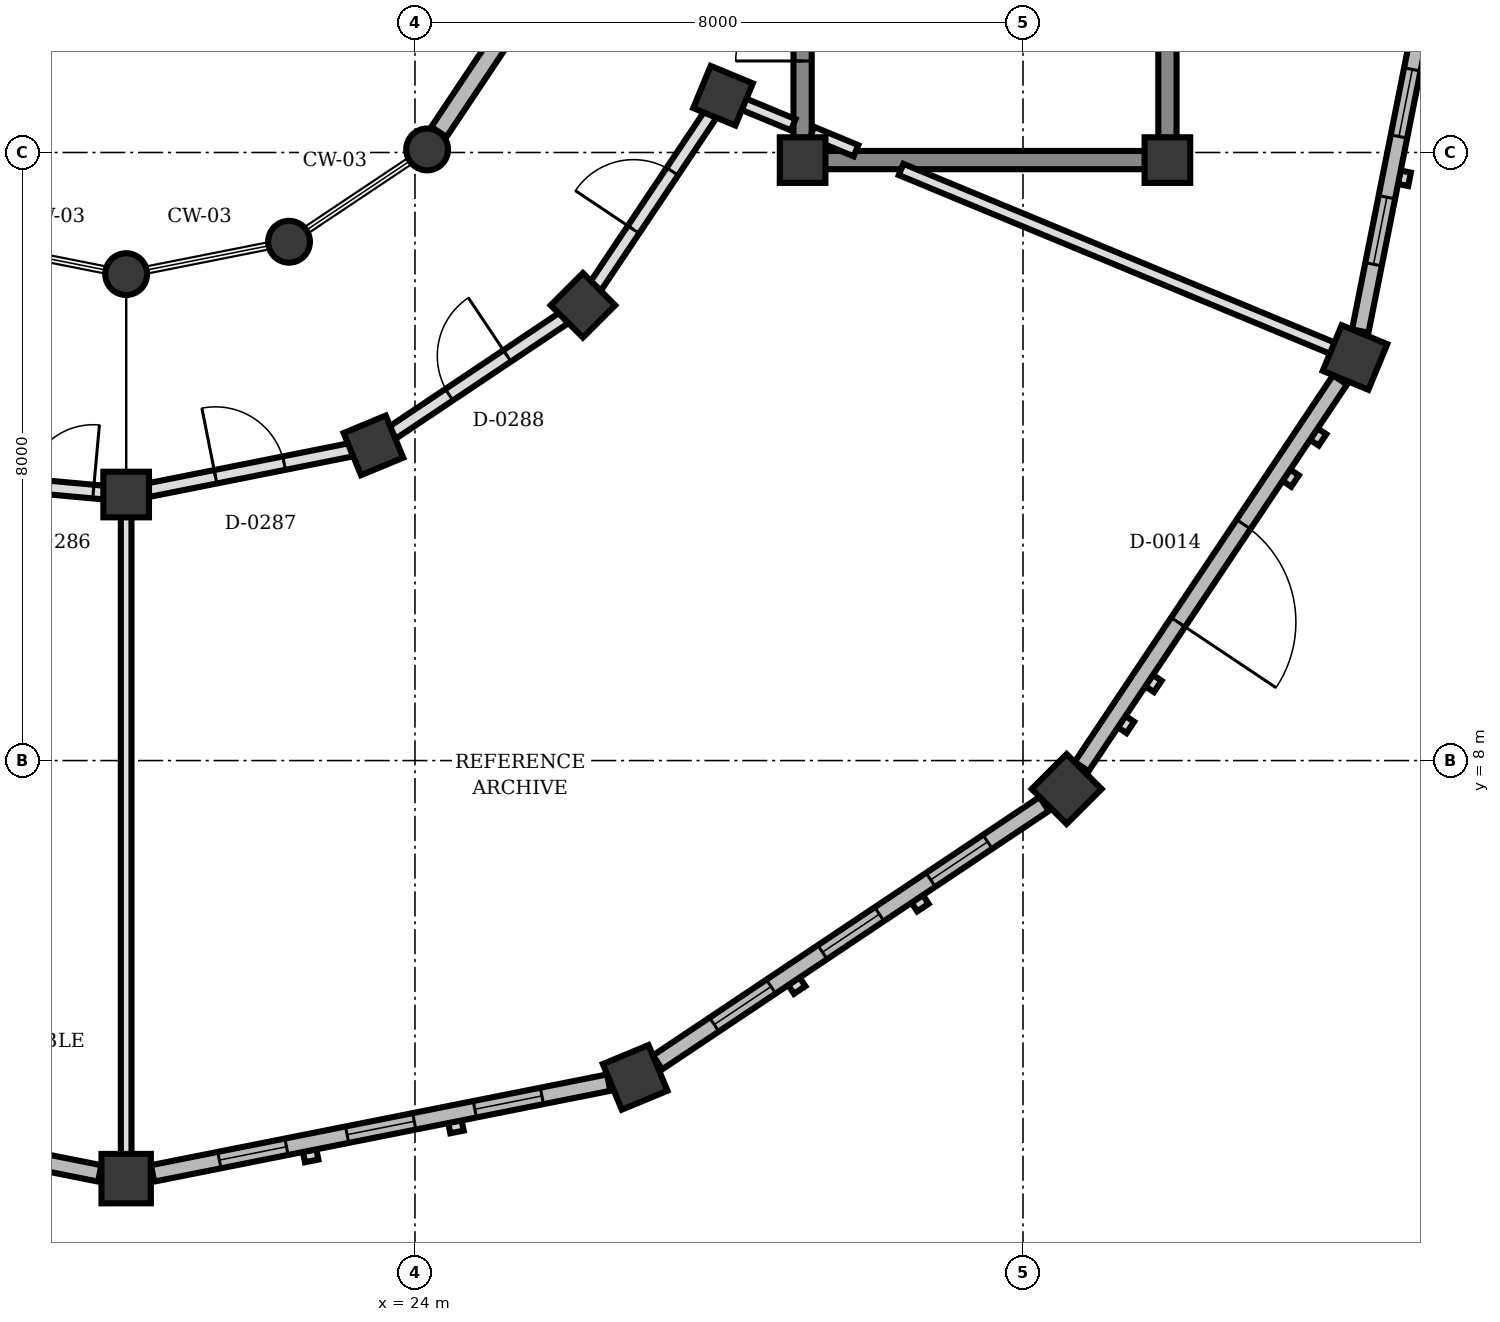
"""IFC4 building model, lengths in metres.
Left out: names, types, materials, properties, quantities, classifications, styles, units other than length and angle.
Written with IfcOpenShell. Run it as: python <this file> out.ifc"""

import sys

from ifc_helpers import new_model, si_unit, direction, frame, frame_2d, origin, origin_2d, place, context, subcontext, project, spatial, rectangle, circle, extrude, element, fill, save


model = new_model("IFC4")
c1 = context("Model", 3, precision=1e-05, world=origin(), true_north=direction((0.0, 1.0)))
c2 = subcontext(c1, "Body", "Model", "MODEL_VIEW")
j1 = project(units=[si_unit("LENGTHUNIT", "METRE"), si_unit("PLANEANGLEUNIT", "RADIAN")], contexts=[c1])
p1 = place(None, origin())
s1 = spatial("IfcSite", under=j1, at=p1, CompositionType="ELEMENT")
p2 = place(p1, origin())
s2 = spatial("IfcBuilding", under=s1, at=p2, CompositionType="ELEMENT")
p3 = place(p2, origin())
s3 = spatial("IfcBuildingStorey", under=s2, at=p3, CompositionType="ELEMENT", Elevation=0.0)
for number, where, z_axis, x_axis in (
    (1, (29.1, 15.9, 0.0), (0.0, 0.0, 1.0), (1.0, 0.0, 0.0)),
    (2, (33.9, 15.9, 0.0), (0.0, 0.0, 1.0), (1.0, 0.0, 0.0)),
):
    element("IfcColumn", number, at=place(p3, frame(where, z_axis=z_axis, x_axis=x_axis)), inside=s3, PredefinedType="COLUMN", context=c2, shape_type="SweptSolid", body=[
        extrude(rectangle(XDim=0.6, YDim=0.6, at=origin_2d()), origin(), (0.0, 0.0, 1.0), 4.5),
    ])
for number, where, z_axis, x_axis in (
    (3, (20.2, 14.4, 0.0), (0.0, 0.0, 1.0), (1.0, 0.0, 0.0)),
    (4, (22.343, 14.826, 0.0), (0.0, 0.0, 1.0), (1.0, 0.0, 0.0)),
    (5, (24.16, 16.04, 0.0), (0.0, 0.0, 1.0), (1.0, 0.0, 0.0)),
):
    element("IfcColumn", number, at=place(p3, frame(where, z_axis=z_axis, x_axis=x_axis)), inside=s3, PredefinedType="COLUMN", context=c2, shape_type="SweptSolid", body=[
        extrude(circle(Radius=0.275, at=origin_2d()), origin(), (0.0, 0.0, 1.0), 4.5),
    ])
for number, where, z_axis, x_axis in (
    (6, (20.2, 11.5, 0.0), (0.0, 0.0, 1.0), (0.0, -1.0, 0.0)),
    (7, (23.453, 12.147, 0.0), (0.0, 0.0, 1.0), (0.383, -0.924, 0.0)),
    (8, (26.21, 13.99, 0.0), (0.0, 0.0, 1.0), (0.707, -0.707, 0.0)),
    (9, (28.053, 16.747, 0.0), (0.0, 0.0, 1.0), (0.924, -0.383, 0.0)),
):
    element("IfcColumn", number, at=place(p3, frame(where, z_axis=z_axis, x_axis=x_axis)), inside=s3, PredefinedType="COLUMN", context=c2, shape_type="SweptSolid", body=[
        extrude(rectangle(XDim=0.6, YDim=0.6, at=origin_2d()), origin(), (0.0, 0.0, 1.0), 4.5),
    ])
for number, where, z_axis, x_axis in (
    (10, (20.2, 2.5, 0.0), (0.0, 0.0, 1.0), (0.0, -1.0, 0.0)),
    (11, (26.897, 3.832, 0.0), (0.0, 0.0, 1.0), (0.383, -0.924, 0.0)),
    (12, (32.574, 7.626, 0.0), (0.0, 0.0, 1.0), (0.707, -0.707, 0.0)),
    (13, (36.368, 13.303, 0.0), (0.0, 0.0, 1.0), (0.924, -0.383, 0.0)),
):
    element("IfcColumn", number, at=place(p3, frame(where, z_axis=z_axis, x_axis=x_axis)), inside=s3, PredefinedType="COLUMN", context=c2, shape_type="SweptSolid", body=[
        extrude(rectangle(XDim=0.65, YDim=0.65, at=origin_2d()), origin(), (0.0, 0.0, 1.0), 4.5),
    ])
p4 = place(p3, frame((19.852, 2.569, 0.0), z_axis=(0.0, 0.0, 1.0), x_axis=(-0.98077967596, 0.19511849534, 0.0)))
e14 = element("IfcWall", 14, at=p4, inside=s3, PredefinedType="SOLIDWALL", context=c2, shape_type="SweptSolid", body=[
    extrude(rectangle(XDim=6.119, YDim=0.22, at=frame_2d((3.059, 0.0))), origin(), (0.0, 0.0, 1.0), 3.55),
])
p5 = place(p4, frame((1.068, 0.0, 1.15)))
e15 = element("IfcOpeningElement", 15, at=p5, cuts=e14, PredefinedType="OPENING", context=c2, shape_type="SweptSolid", body=[
    extrude(rectangle(XDim=0.8, YDim=1.1, at=frame_2d((0.4, 0.55))), frame((0.0, 0.12, 0.0), z_axis=(0.0, -1.0, 0.0), x_axis=(1.0, 0.0, 0.0)), (0.0, 0.0, 1.0), 0.24),
])
p6 = place(p4, frame((4.373, 0.0, 1.15)))
e16 = element("IfcOpeningElement", 16, at=p6, cuts=e14, PredefinedType="OPENING", context=c2, shape_type="SweptSolid", body=[
    extrude(rectangle(XDim=0.8, YDim=1.1, at=frame_2d((0.4, 0.55))), frame((0.0, 0.12, 0.0), z_axis=(0.0, -1.0, 0.0), x_axis=(1.0, 0.0, 0.0)), (0.0, 0.0, 1.0), 0.24),
])
p7 = place(p3, frame((26.549, 3.763, 0.0), z_axis=(0.0, 0.0, 1.0), x_axis=(-0.98077967596, -0.19511849534, 0.0)))
e17 = element("IfcWall", 17, at=p7, inside=s3, PredefinedType="SOLIDWALL", context=c2, shape_type="SweptSolid", body=[
    extrude(rectangle(XDim=6.119, YDim=0.22, at=frame_2d((3.059, 0.0))), origin(), (0.0, 0.0, 1.0), 3.55),
])
p8 = place(p7, frame((0.896, 0.0, 0.85)))
e18 = element("IfcOpeningElement", 18, at=p8, cuts=e17, PredefinedType="OPENING", context=c2, shape_type="SweptSolid", body=[
    extrude(rectangle(XDim=0.9, YDim=1.4, at=frame_2d((0.45, 0.7))), frame((0.0, 0.12, 0.0), z_axis=(0.0, -1.0, 0.0), x_axis=(1.0, 0.0, 0.0)), (0.0, 0.0, 1.0), 0.24),
])
p9 = place(p7, frame((2.609, 0.0, 0.85)))
e19 = element("IfcOpeningElement", 19, at=p9, cuts=e17, PredefinedType="OPENING", context=c2, shape_type="SweptSolid", body=[
    extrude(rectangle(XDim=0.9, YDim=1.4, at=frame_2d((0.45, 0.7))), frame((0.0, 0.12, 0.0), z_axis=(0.0, -1.0, 0.0), x_axis=(1.0, 0.0, 0.0)), (0.0, 0.0, 1.0), 0.24),
])
p10 = place(p7, frame((4.323, 0.0, 0.85)))
e20 = element("IfcOpeningElement", 20, at=p10, cuts=e17, PredefinedType="OPENING", context=c2, shape_type="SweptSolid", body=[
    extrude(rectangle(XDim=0.9, YDim=1.4, at=frame_2d((0.45, 0.7))), frame((0.0, 0.12, 0.0), z_axis=(0.0, -1.0, 0.0), x_axis=(1.0, 0.0, 0.0)), (0.0, 0.0, 1.0), 0.24),
])
p11 = place(p3, frame((32.279, 7.429, 0.0), z_axis=(0.0, 0.0, 1.0), x_axis=(-0.831411331728, -0.555657446161, 0.0)))
e21 = element("IfcWall", 21, at=p11, inside=s3, PredefinedType="SOLIDWALL", context=c2, shape_type="SweptSolid", body=[
    extrude(rectangle(XDim=6.119, YDim=0.22, at=frame_2d((3.059, 0.0))), origin(), (0.0, 0.0, 1.0), 3.55),
])
p12 = place(p11, frame((0.896, 0.0, 0.85)))
e22 = element("IfcOpeningElement", 22, at=p12, cuts=e21, PredefinedType="OPENING", context=c2, shape_type="SweptSolid", body=[
    extrude(rectangle(XDim=0.9, YDim=1.4, at=frame_2d((0.45, 0.7))), frame((0.0, 0.12, 0.0), z_axis=(0.0, -1.0, 0.0), x_axis=(1.0, 0.0, 0.0)), (0.0, 0.0, 1.0), 0.24),
])
p13 = place(p11, frame((2.609, 0.0, 0.85)))
e23 = element("IfcOpeningElement", 23, at=p13, cuts=e21, PredefinedType="OPENING", context=c2, shape_type="SweptSolid", body=[
    extrude(rectangle(XDim=0.9, YDim=1.4, at=frame_2d((0.45, 0.7))), frame((0.0, 0.12, 0.0), z_axis=(0.0, -1.0, 0.0), x_axis=(1.0, 0.0, 0.0)), (0.0, 0.0, 1.0), 0.24),
])
p14 = place(p11, frame((4.323, 0.0, 0.85)))
e24 = element("IfcOpeningElement", 24, at=p14, cuts=e21, PredefinedType="OPENING", context=c2, shape_type="SweptSolid", body=[
    extrude(rectangle(XDim=0.9, YDim=1.4, at=frame_2d((0.45, 0.7))), frame((0.0, 0.12, 0.0), z_axis=(0.0, -1.0, 0.0), x_axis=(1.0, 0.0, 0.0)), (0.0, 0.0, 1.0), 0.24),
])
p15 = place(p3, frame((36.171, 13.008, 0.0), z_axis=(0.0, 0.0, 1.0), x_axis=(-0.555657446161, -0.831411331728, 0.0)))
e25 = element("IfcWall", 25, at=p15, inside=s3, PredefinedType="SOLIDWALL", context=c2, shape_type="SweptSolid", body=[
    extrude(rectangle(XDim=6.119, YDim=0.22, at=frame_2d((3.059, 0.0))), origin(), (0.0, 0.0, 1.0), 3.55),
])
p16 = place(p15, frame((2.284, 0.0, 0.0)))
e26 = element("IfcOpeningElement", 26, at=p16, cuts=e25, PredefinedType="OPENING", context=c2, shape_type="SweptSolid", body=[
    extrude(rectangle(XDim=1.55, YDim=2.2, at=frame_2d((0.775, 1.1))), frame((0.0, 0.12, 0.0), z_axis=(0.0, -1.0, 0.0), x_axis=(1.0, 0.0, 0.0)), (0.0, 0.0, 1.0), 0.24),
])
p17 = place(p3, frame((24.314, 16.27, 0.0), z_axis=(0.0, 0.0, 1.0), x_axis=(0.555287078904, 0.83165874011, 0.0)))
e27 = element("IfcWall", 27, at=p17, inside=s3, PredefinedType="SOLIDWALL", context=c2, shape_type="SweptSolid", body=[
    extrude(rectangle(XDim=1.632, YDim=0.24, at=frame_2d((0.816, 0.0))), origin(), (0.0, 0.0, 1.0), 3.55),
])
p18 = place(p3, frame((37.631, 19.652, 0.0), z_axis=(0.0, 0.0, 1.0), x_axis=(-0.195149240347, -0.980773558979, 0.0)))
e28 = element("IfcWall", 28, at=p18, inside=s3, PredefinedType="SOLIDWALL", context=c2, shape_type="SweptSolid", body=[
    extrude(rectangle(XDim=6.119, YDim=0.22, at=frame_2d((3.06, 0.0))), origin(), (0.0, 0.0, 1.0), 3.55),
])
p19 = place(p18, frame((0.896, 0.0, 0.85)))
e29 = element("IfcOpeningElement", 29, at=p19, cuts=e28, PredefinedType="OPENING", context=c2, shape_type="SweptSolid", body=[
    extrude(rectangle(XDim=0.9, YDim=1.4, at=frame_2d((0.45, 0.7))), frame((0.0, 0.12, 0.0), z_axis=(0.0, -1.0, 0.0), x_axis=(1.0, 0.0, 0.0)), (0.0, 0.0, 1.0), 0.24),
])
p20 = place(p18, frame((2.609, 0.0, 0.85)))
e30 = element("IfcOpeningElement", 30, at=p20, cuts=e28, PredefinedType="OPENING", context=c2, shape_type="SweptSolid", body=[
    extrude(rectangle(XDim=0.9, YDim=1.4, at=frame_2d((0.45, 0.7))), frame((0.0, 0.12, 0.0), z_axis=(0.0, -1.0, 0.0), x_axis=(1.0, 0.0, 0.0)), (0.0, 0.0, 1.0), 0.24),
])
p21 = place(p18, frame((4.323, 0.0, 0.85)))
e31 = element("IfcOpeningElement", 31, at=p21, cuts=e28, PredefinedType="OPENING", context=c2, shape_type="SweptSolid", body=[
    extrude(rectangle(XDim=0.9, YDim=1.4, at=frame_2d((0.45, 0.7))), frame((0.0, 0.12, 0.0), z_axis=(0.0, -1.0, 0.0), x_axis=(1.0, 0.0, 0.0)), (0.0, 0.0, 1.0), 0.24),
])
p22 = place(p3, frame((29.1, 16.192, 0.0), z_axis=(0.0, 0.0, 1.0), x_axis=(0.0, 1.0, 0.0)))
e32 = element("IfcWall", 32, at=p22, inside=s3, PredefinedType="SHEAR", context=c2, shape_type="SweptSolid", body=[
    extrude(rectangle(XDim=8.136, YDim=0.24, at=frame_2d((4.068, 0.0))), origin(), (0.0, 0.0, 1.0), 4.24),
])
p23 = place(p22, frame((1.012, 0.0, 0.0)))
e33 = element("IfcOpeningElement", 33, at=p23, cuts=e32, PredefinedType="OPENING", context=c2, shape_type="SweptSolid", body=[
    extrude(rectangle(XDim=0.88, YDim=2.1, at=frame_2d((0.44, 1.05))), frame((0.0, 0.13, 0.0), z_axis=(0.0, -1.0, 0.0), x_axis=(1.0, 0.0, 0.0)), (0.0, 0.0, 1.0), 0.26),
])
p24 = place(p3, frame((33.9, 24.328, 0.0), z_axis=(0.0, 0.0, 1.0), x_axis=(0.0, -1.0, 0.0)))
e34 = element("IfcWall", 34, at=p24, inside=s3, PredefinedType="SHEAR", context=c2, shape_type="SweptSolid", body=[
    extrude(rectangle(XDim=8.136, YDim=0.24, at=frame_2d((4.068, 0.0))), origin(), (0.0, 0.0, 1.0), 4.24),
])
p25 = place(p3, frame((33.608, 15.9, 0.0), z_axis=(0.0, 0.0, 1.0), x_axis=(-1.0, 0.0, 0.0)))
e35 = element("IfcWall", 35, at=p25, inside=s3, PredefinedType="SHEAR", context=c2, shape_type="SweptSolid", body=[
    extrude(rectangle(XDim=4.216, YDim=0.24, at=frame_2d((2.108, 0.0))), origin(), (0.0, 0.0, 1.0), 4.24),
])
p26 = place(p3, frame((20.2, 11.208, 0.0), z_axis=(0.0, 0.0, 1.0), x_axis=(0.0, -1.0, 0.0)))
e36 = element("IfcWall", 36, at=p26, inside=s3, PredefinedType="PARTITIONING", context=c2, shape_type="SweptSolid", body=[
    extrude(rectangle(XDim=8.391, YDim=0.14, at=frame_2d((4.196, 0.0))), origin(), (0.0, 0.0, 1.0), 3.552),
])
p27 = place(p3, frame((28.323, 16.636, 0.0), z_axis=(0.0, 0.0, 1.0), x_axis=(0.923840285319, -0.382778169729, 0.0)))
e37 = element("IfcWall", 37, at=p27, inside=s3, PredefinedType="PARTITIONING", context=c2, shape_type="SweptSolid", body=[
    extrude(rectangle(XDim=0.708, YDim=0.16, at=frame_2d((0.354, 0.0))), origin(), (0.0, 0.0, 1.0), 3.552),
])
p28 = place(p3, frame((29.223, 16.263, 0.0), z_axis=(0.0, 0.0, 1.0), x_axis=(0.923812676193, -0.382844797933, 0.0)))
e38 = element("IfcWall", 38, at=p28, inside=s3, PredefinedType="PARTITIONING", context=c2, shape_type="SweptSolid", body=[
    extrude(rectangle(XDim=0.627, YDim=0.16, at=frame_2d((0.313, 0.0))), origin(), (0.0, 0.0, 1.0), 3.552),
])
p29 = place(p3, frame((30.396, 15.777, 0.0), z_axis=(0.0, 0.0, 1.0), x_axis=(0.923837705987, -0.382784394923, 0.0)))
e39 = element("IfcWall", 39, at=p29, inside=s3, PredefinedType="PARTITIONING", context=c2, shape_type="SweptSolid", body=[
    extrude(rectangle(XDim=6.147, YDim=0.16, at=frame_2d((3.074, 0.0))), origin(), (0.0, 0.0, 1.0), 3.552),
])
p30 = place(p3, frame((18.673, 11.638, 0.0), z_axis=(0.0, 0.0, 1.0), x_axis=(0.995907718878, -0.090375967372, 0.0)))
e40 = element("IfcWall", 40, at=p30, inside=s3, PredefinedType="PARTITIONING", context=c2, shape_type="SweptSolid", body=[
    extrude(rectangle(XDim=1.24, YDim=0.18, at=frame_2d((0.62, 0.0))), origin(), (0.0, 0.0, 1.0), 3.552),
])
p31 = place(p30, frame((0.22, 0.0, 0.0)))
e41 = element("IfcOpeningElement", 41, at=p31, cuts=e40, PredefinedType="OPENING", context=c2, shape_type="SweptSolid", body=[
    extrude(rectangle(XDim=0.88, YDim=2.1, at=frame_2d((0.44, 1.05))), frame((0.0, 0.1, 0.0), z_axis=(0.0, -1.0, 0.0), x_axis=(1.0, 0.0, 0.0)), (0.0, 0.0, 1.0), 0.2),
])
p32 = place(p3, frame((20.492, 11.558, 0.0), z_axis=(0.0, 0.0, 1.0), x_axis=(0.980776867939, 0.195132609565, 0.0)))
e42 = element("IfcWall", 42, at=p32, inside=s3, PredefinedType="PARTITIONING", context=c2, shape_type="SweptSolid", body=[
    extrude(rectangle(XDim=2.721, YDim=0.18, at=frame_2d((1.361, 0.0))), origin(), (0.0, 0.0, 1.0), 3.552),
])
p33 = place(p32, frame((0.901, 0.0, 0.0)))
e43 = element("IfcOpeningElement", 43, at=p33, cuts=e42, PredefinedType="OPENING", context=c2, shape_type="SweptSolid", body=[
    extrude(rectangle(XDim=0.92, YDim=2.1, at=frame_2d((0.46, 1.05))), frame((0.0, 0.1, 0.0), z_axis=(0.0, -1.0, 0.0), x_axis=(1.0, 0.0, 0.0)), (0.0, 0.0, 1.0), 0.2),
])
p34 = place(p3, frame((23.701, 12.312, 0.0), z_axis=(0.0, 0.0, 1.0), x_axis=(0.831096426298, 0.556128339679, 0.0)))
e44 = element("IfcWall", 44, at=p34, inside=s3, PredefinedType="PARTITIONING", context=c2, shape_type="SweptSolid", body=[
    extrude(rectangle(XDim=2.72, YDim=0.18, at=frame_2d((1.36, 0.0))), origin(), (0.0, 0.0, 1.0), 3.552),
])
p35 = place(p34, frame((0.9, 0.0, 0.0)))
e45 = element("IfcOpeningElement", 45, at=p35, cuts=e44, PredefinedType="OPENING", context=c2, shape_type="SweptSolid", body=[
    extrude(rectangle(XDim=0.92, YDim=2.1, at=frame_2d((0.46, 1.05))), frame((0.0, 0.1, 0.0), z_axis=(0.0, -1.0, 0.0), x_axis=(1.0, 0.0, 0.0)), (0.0, 0.0, 1.0), 0.2),
])
p36 = place(p3, frame((26.375, 14.238, 0.0), z_axis=(0.0, 0.0, 1.0), x_axis=(0.556128339679, 0.831096426298, 0.0)))
e46 = element("IfcWall", 46, at=p36, inside=s3, PredefinedType="PARTITIONING", context=c2, shape_type="SweptSolid", body=[
    extrude(rectangle(XDim=2.72, YDim=0.18, at=frame_2d((1.36, 0.0))), origin(), (0.0, 0.0, 1.0), 3.552),
])
p37 = place(p36, frame((0.9, 0.0, 0.0)))
e47 = element("IfcOpeningElement", 47, at=p37, cuts=e46, PredefinedType="OPENING", context=c2, shape_type="SweptSolid", body=[
    extrude(rectangle(XDim=0.92, YDim=2.1, at=frame_2d((0.46, 1.05))), frame((0.0, 0.1, 0.0), z_axis=(0.0, -1.0, 0.0), x_axis=(1.0, 0.0, 0.0)), (0.0, 0.0, 1.0), 0.2),
])
p38 = place(p8, origin())
e48 = element("IfcWindow", 48, at=p38, inside=s3, PartitioningType="SINGLE_PANEL", PredefinedType="WINDOW", context=c2, shape_type="SweptSolid", body=[
    extrude(rectangle(XDim=0.9, YDim=1.4, at=frame_2d((0.45, 0.7))), frame((0.0, 0.03, 0.0), z_axis=(0.0, -1.0, 0.0), x_axis=(1.0, 0.0, 0.0)), (0.0, 0.0, 1.0), 0.06),
])
fill(e18, e48)
p39 = place(p9, origin())
e49 = element("IfcWindow", 49, at=p39, inside=s3, PartitioningType="SINGLE_PANEL", PredefinedType="WINDOW", context=c2, shape_type="SweptSolid", body=[
    extrude(rectangle(XDim=0.9, YDim=1.4, at=frame_2d((0.45, 0.7))), frame((0.0, 0.03, 0.0), z_axis=(0.0, -1.0, 0.0), x_axis=(1.0, 0.0, 0.0)), (0.0, 0.0, 1.0), 0.06),
])
fill(e19, e49)
p40 = place(p10, origin())
e50 = element("IfcWindow", 50, at=p40, inside=s3, PartitioningType="SINGLE_PANEL", PredefinedType="WINDOW", context=c2, shape_type="SweptSolid", body=[
    extrude(rectangle(XDim=0.9, YDim=1.4, at=frame_2d((0.45, 0.7))), frame((0.0, 0.03, 0.0), z_axis=(0.0, -1.0, 0.0), x_axis=(1.0, 0.0, 0.0)), (0.0, 0.0, 1.0), 0.06),
])
fill(e20, e50)
p41 = place(p12, origin())
e51 = element("IfcWindow", 51, at=p41, inside=s3, PartitioningType="SINGLE_PANEL", PredefinedType="WINDOW", context=c2, shape_type="SweptSolid", body=[
    extrude(rectangle(XDim=0.9, YDim=1.4, at=frame_2d((0.45, 0.7))), frame((0.0, 0.03, 0.0), z_axis=(0.0, -1.0, 0.0), x_axis=(1.0, 0.0, 0.0)), (0.0, 0.0, 1.0), 0.06),
])
fill(e22, e51)
p42 = place(p13, origin())
e52 = element("IfcWindow", 52, at=p42, inside=s3, PartitioningType="SINGLE_PANEL", PredefinedType="WINDOW", context=c2, shape_type="SweptSolid", body=[
    extrude(rectangle(XDim=0.9, YDim=1.4, at=frame_2d((0.45, 0.7))), frame((0.0, 0.03, 0.0), z_axis=(0.0, -1.0, 0.0), x_axis=(1.0, 0.0, 0.0)), (0.0, 0.0, 1.0), 0.06),
])
fill(e23, e52)
p43 = place(p14, origin())
e53 = element("IfcWindow", 53, at=p43, inside=s3, PartitioningType="SINGLE_PANEL", PredefinedType="WINDOW", context=c2, shape_type="SweptSolid", body=[
    extrude(rectangle(XDim=0.9, YDim=1.4, at=frame_2d((0.45, 0.7))), frame((0.0, 0.03, 0.0), z_axis=(0.0, -1.0, 0.0), x_axis=(1.0, 0.0, 0.0)), (0.0, 0.0, 1.0), 0.06),
])
fill(e24, e53)
p44 = place(p16, origin())
e54 = element("IfcDoor", 54, at=p44, inside=s3, OperationType="SINGLE_SWING_RIGHT", PredefinedType="DOOR", context=c2, shape_type="SweptSolid", body=[
    extrude(rectangle(XDim=1.55, YDim=2.2, at=frame_2d((0.775, 1.1))), frame((0.0, 0.025, 0.0), z_axis=(0.0, -1.0, 0.0), x_axis=(1.0, 0.0, 0.0)), (0.0, 0.0, 1.0), 0.05),
])
fill(e26, e54)
p45 = place(p20, origin())
e55 = element("IfcWindow", 55, at=p45, inside=s3, PartitioningType="SINGLE_PANEL", PredefinedType="WINDOW", context=c2, shape_type="SweptSolid", body=[
    extrude(rectangle(XDim=0.9, YDim=1.4, at=frame_2d((0.45, 0.7))), frame((0.0, 0.03, 0.0), z_axis=(0.0, -1.0, 0.0), x_axis=(1.0, 0.0, 0.0)), (0.0, 0.0, 1.0), 0.06),
])
fill(e30, e55)
p46 = place(p21, origin())
e56 = element("IfcWindow", 56, at=p46, inside=s3, PartitioningType="SINGLE_PANEL", PredefinedType="WINDOW", context=c2, shape_type="SweptSolid", body=[
    extrude(rectangle(XDim=0.9, YDim=1.4, at=frame_2d((0.45, 0.7))), frame((0.0, 0.03, 0.0), z_axis=(0.0, -1.0, 0.0), x_axis=(1.0, 0.0, 0.0)), (0.0, 0.0, 1.0), 0.06),
])
fill(e31, e56)
p47 = place(p23, origin())
e57 = element("IfcDoor", 57, at=p47, inside=s3, OperationType="SINGLE_SWING_LEFT", PredefinedType="DOOR", context=c2, shape_type="SweptSolid", body=[
    extrude(rectangle(XDim=0.88, YDim=2.1, at=frame_2d((0.44, 1.05))), frame((0.0, 0.025, 0.0), z_axis=(0.0, -1.0, 0.0), x_axis=(1.0, 0.0, 0.0)), (0.0, 0.0, 1.0), 0.05),
])
fill(e33, e57)
p48 = place(p31, origin())
e58 = element("IfcDoor", 58, at=p48, inside=s3, OperationType="SINGLE_SWING_RIGHT", PredefinedType="DOOR", context=c2, shape_type="SweptSolid", body=[
    extrude(rectangle(XDim=0.88, YDim=2.1, at=frame_2d((0.44, 1.05))), frame((0.0, 0.025, 0.0), z_axis=(0.0, -1.0, 0.0), x_axis=(1.0, 0.0, 0.0)), (0.0, 0.0, 1.0), 0.05),
])
fill(e41, e58)
p49 = place(p33, origin())
e59 = element("IfcDoor", 59, at=p49, inside=s3, OperationType="SINGLE_SWING_LEFT", PredefinedType="DOOR", context=c2, shape_type="SweptSolid", body=[
    extrude(rectangle(XDim=0.92, YDim=2.1, at=frame_2d((0.46, 1.05))), frame((0.0, 0.025, 0.0), z_axis=(0.0, -1.0, 0.0), x_axis=(1.0, 0.0, 0.0)), (0.0, 0.0, 1.0), 0.05),
])
fill(e43, e59)
p50 = place(p35, origin())
e60 = element("IfcDoor", 60, at=p50, inside=s3, OperationType="SINGLE_SWING_RIGHT", PredefinedType="DOOR", context=c2, shape_type="SweptSolid", body=[
    extrude(rectangle(XDim=0.92, YDim=2.1, at=frame_2d((0.46, 1.05))), frame((0.0, 0.025, 0.0), z_axis=(0.0, -1.0, 0.0), x_axis=(1.0, 0.0, 0.0)), (0.0, 0.0, 1.0), 0.05),
])
fill(e45, e60)
p51 = place(p37, origin())
e61 = element("IfcDoor", 61, at=p51, inside=s3, OperationType="SINGLE_SWING_LEFT", PredefinedType="DOOR", context=c2, shape_type="SweptSolid", body=[
    extrude(rectangle(XDim=0.92, YDim=2.1, at=frame_2d((0.46, 1.05))), frame((0.0, 0.025, 0.0), z_axis=(0.0, -1.0, 0.0), x_axis=(1.0, 0.0, 0.0)), (0.0, 0.0, 1.0), 0.05),
])
fill(e47, e61)
save(model, sys.argv[1])
